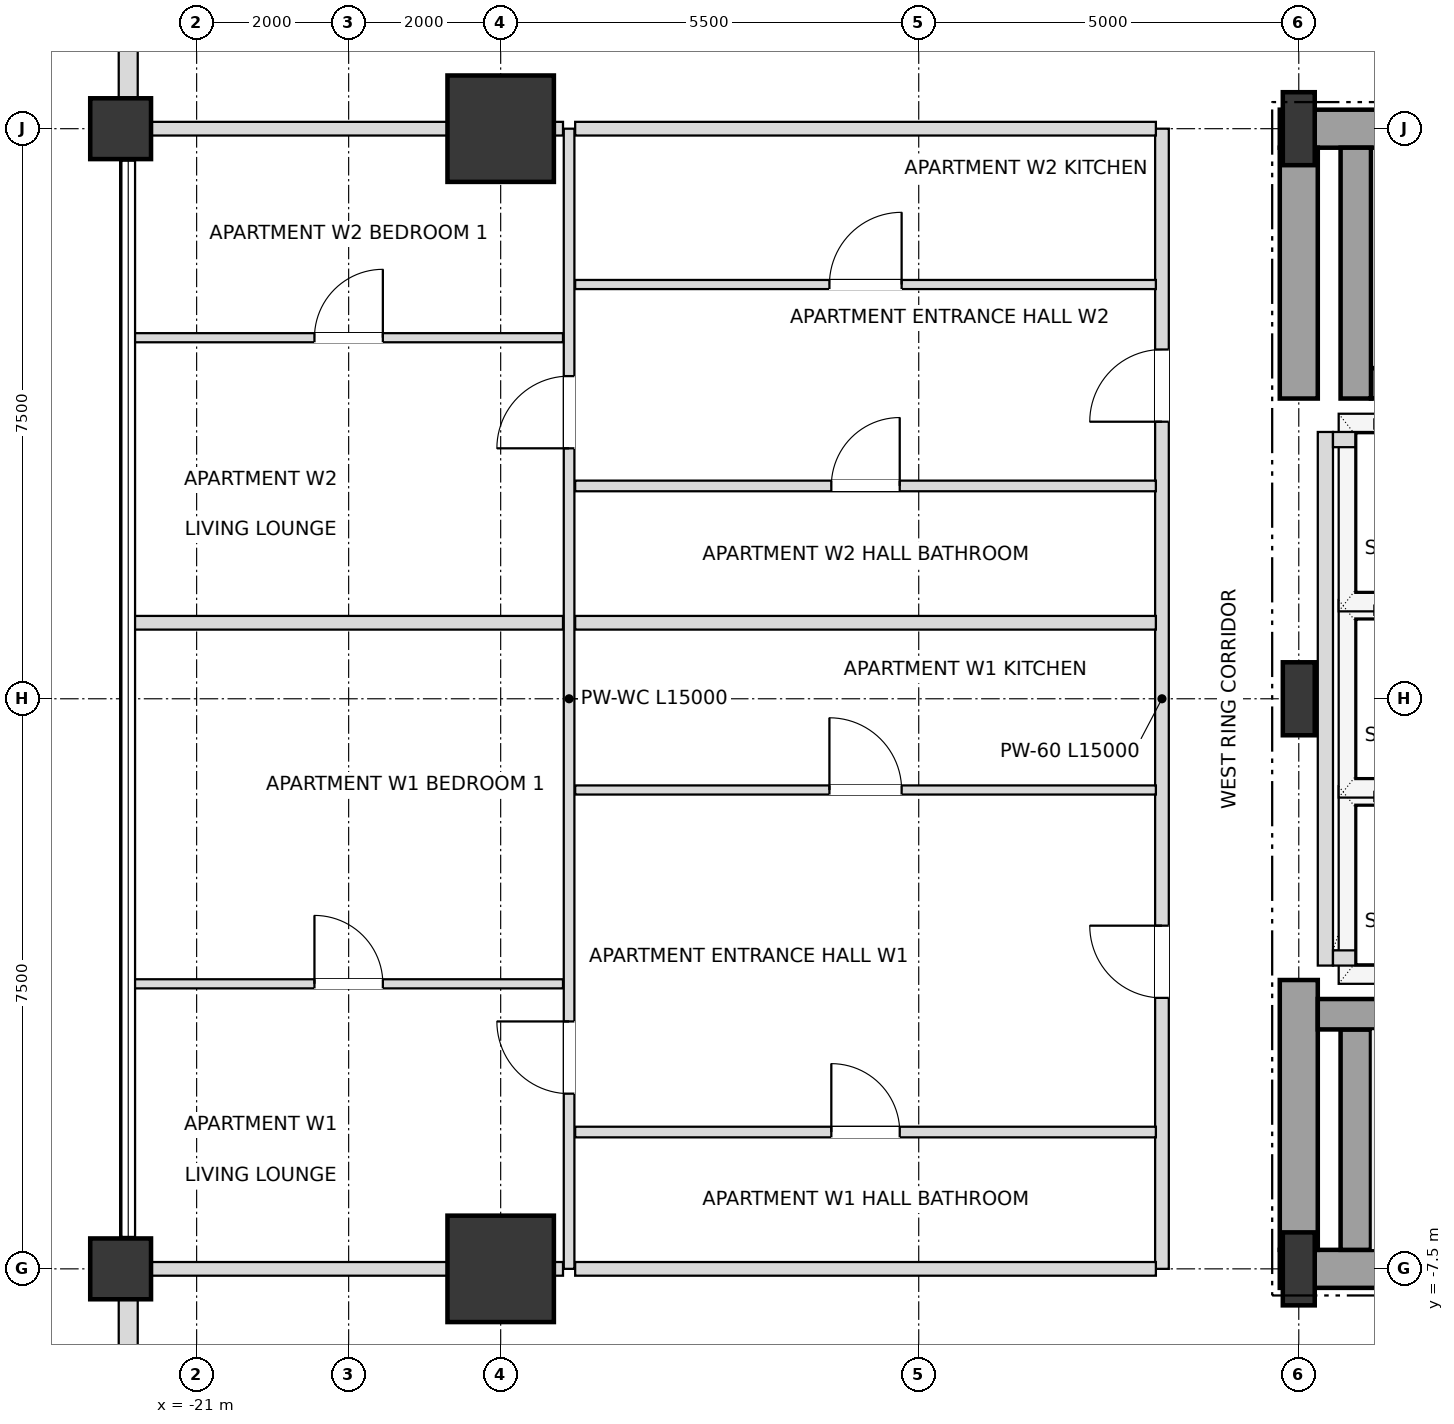
"""IFC4 building model, lengths in metres.
Left out: names, types, materials, properties, quantities, classifications, styles, units other than length and angle.
Written with IfcOpenShell. Run it as: python <this file> out.ifc"""

import sys

from ifc_helpers import new_model, si_unit, direction, frame, frame_2d, origin, origin_2d, place, context, subcontext, project, spatial, rectangle, i_section, extrude, element, fill, save


model = new_model("IFC4")
c1 = context("Model", 3, precision=1e-05, world=origin(), true_north=direction((0.0, 1.0)))
c2 = subcontext(c1, "Body", "Model", "MODEL_VIEW")
j1 = project(units=[si_unit("LENGTHUNIT", "METRE"), si_unit("PLANEANGLEUNIT", "RADIAN")], contexts=[c1])
p1 = place(None, origin())
s1 = spatial("IfcSite", under=j1, at=p1, CompositionType="ELEMENT")
p2 = place(p1, origin())
s2 = spatial("IfcBuilding", under=s1, at=p2, CompositionType="ELEMENT")
p3 = place(p2, frame((0.0, 0.0, 36.0)))
s3 = spatial("IfcBuildingStorey", under=s2, at=p3, CompositionType="ELEMENT", Elevation=36.0)
for number, where, z_axis, x_axis in (
    (1, (-6.5, -7.5, 0.0), (0.0, 0.0, 1.0), (1.0, 0.0, 0.0)),
    (2, (-6.5, 0.0, 0.0), (0.0, 0.0, 1.0), (1.0, 0.0, 0.0)),
    (3, (-6.5, 7.5, 0.0), (0.0, 0.0, 1.0), (1.0, 0.0, 0.0)),
):
    element("IfcColumn", number, at=place(p3, frame(where, z_axis=z_axis, x_axis=x_axis)), inside=s3, PredefinedType="COLUMN", context=c2, shape_type="SweptSolid", body=[
        extrude(i_section(OverallWidth=0.42, OverallDepth=0.96, WebThickness=0.022, FlangeThickness=0.034, at=origin_2d()), origin(), (0.0, 0.0, 1.0), 3.6),
    ])
for number, where, z_axis, x_axis in (
    (4, (-17.0, 7.5, 0.0), (0.0, 0.0, 1.0), (1.0, 0.0, 0.0)),
    (5, (-17.0, -7.5, 0.0), (0.0, 0.0, 1.0), (1.0, 0.0, 0.0)),
):
    element("IfcColumn", number, at=place(p3, frame(where, z_axis=z_axis, x_axis=x_axis)), inside=s3, PredefinedType="USERDEFINED", context=c2, shape_type="SweptSolid", body=[
        extrude(rectangle(XDim=1.4, YDim=1.4, at=origin_2d()), origin(), (0.0, 0.0, 1.0), 3.6),
    ])
for number, where, z_axis, x_axis in (
    (6, (-22.0, -7.5, 0.0), (0.0, 0.0, 1.0), (1.0, 0.0, 0.0)),
    (7, (-22.0, 7.5, 0.0), (0.0, 0.0, 1.0), (1.0, 0.0, 0.0)),
):
    element("IfcColumn", number, at=place(p3, frame(where, z_axis=z_axis, x_axis=x_axis)), inside=s3, PredefinedType="COLUMN", context=c2, shape_type="SweptSolid", body=[
        extrude(rectangle(XDim=0.8, YDim=0.8, at=origin_2d()), origin(), (0.0, 0.0, 1.0), 3.6),
    ])
p4 = place(p3, frame((-21.9, 12.605, 0.0), z_axis=(0.0, 0.0, 1.0), x_axis=(0.0, -1.0, 0.0)))
e8 = element("IfcWall", 8, at=p4, inside=s3, PredefinedType="SOLIDWALL", context=c2, shape_type="SweptSolid", body=[
    extrude(rectangle(XDim=4.71, YDim=0.25, at=frame_2d((2.355, 0.0))), origin(), (0.0, 0.0, 1.0), 2.736),
])
p5 = place(p4, frame((1.455, 0.0, 0.72)))
e9 = element("IfcOpeningElement", 9, at=p5, cuts=e8, PredefinedType="OPENING", context=c2, shape_type="SweptSolid", body=[
    extrude(rectangle(XDim=1.8, YDim=1.68, at=frame_2d((0.9, 0.84))), frame((0.0, 0.135, 0.0), z_axis=(0.0, -1.0, 0.0), x_axis=(1.0, 0.0, 0.0)), (0.0, 0.0, 1.0), 0.27),
])
p6 = place(p3, frame((-21.9, -7.895, 0.0), z_axis=(0.0, 0.0, 1.0), x_axis=(0.0, -1.0, 0.0)))
e10 = element("IfcWall", 10, at=p6, inside=s3, PredefinedType="SOLIDWALL", context=c2, shape_type="SweptSolid", body=[
    extrude(rectangle(XDim=4.71, YDim=0.25, at=frame_2d((2.355, 0.0))), origin(), (0.0, 0.0, 1.0), 2.736),
])
p7 = place(p6, frame((1.455, 0.0, 0.72)))
e11 = element("IfcOpeningElement", 11, at=p7, cuts=e10, PredefinedType="OPENING", context=c2, shape_type="SweptSolid", body=[
    extrude(rectangle(XDim=1.8, YDim=1.68, at=frame_2d((0.9, 0.84))), frame((0.0, 0.135, 0.0), z_axis=(0.0, -1.0, 0.0), x_axis=(1.0, 0.0, 0.0)), (0.0, 0.0, 1.0), 0.27),
])
p8 = place(p3, frame((-6.75, -7.5, 0.0), z_axis=(0.0, 0.0, 1.0), x_axis=(1.0, 0.0, 0.0)))
e12 = element("IfcWall", 12, at=p8, inside=s3, PredefinedType="SHEAR", context=c2, shape_type="SweptSolid", body=[
    extrude(rectangle(XDim=6.75, YDim=0.5, at=frame_2d((3.375, 0.0))), origin(), (0.0, 0.0, 1.0), 3.38),
])
p9 = place(p3, frame((-6.75, 7.5, 0.0), z_axis=(0.0, 0.0, 1.0), x_axis=(1.0, 0.0, 0.0)))
e13 = element("IfcWall", 13, at=p9, inside=s3, PredefinedType="SHEAR", context=c2, shape_type="SweptSolid", body=[
    extrude(rectangle(XDim=6.75, YDim=0.5, at=frame_2d((3.375, 0.0))), origin(), (0.0, 0.0, 1.0), 3.38),
])
p10 = place(p9, frame((1.65, 0.0, 0.0)))
e14 = element("IfcOpeningElement", 14, at=p10, cuts=e13, PredefinedType="OPENING", context=c2, shape_type="SweptSolid", body=[
    extrude(rectangle(XDim=1.05, YDim=2.15, at=frame_2d((0.525, 1.075))), frame((0.0, 0.26, 0.0), z_axis=(0.0, -1.0, 0.0), x_axis=(1.0, 0.0, 0.0)), (0.0, 0.0, 1.0), 0.52),
])
p11 = place(p3, frame((-6.5, -7.25, 0.0), z_axis=(0.0, 0.0, 1.0), x_axis=(0.0, 1.0, 0.0)))
e15 = element("IfcWall", 15, at=p11, inside=s3, PredefinedType="SHEAR", context=c2, shape_type="SweptSolid", body=[
    extrude(rectangle(XDim=3.55, YDim=0.5, at=frame_2d((1.775, 0.0))), origin(), (0.0, 0.0, 1.0), 3.38),
])
p12 = place(p3, frame((-6.5, 3.95, 0.0), z_axis=(0.0, 0.0, 1.0), x_axis=(0.0, 1.0, 0.0)))
e16 = element("IfcWall", 16, at=p12, inside=s3, PredefinedType="SHEAR", context=c2, shape_type="SweptSolid", body=[
    extrude(rectangle(XDim=3.3, YDim=0.5, at=frame_2d((1.65, 0.0))), origin(), (0.0, 0.0, 1.0), 3.38),
])
p13 = place(p3, frame((-5.75, -7.25, 0.0), z_axis=(0.0, 0.0, 1.0), x_axis=(0.0, 1.0, 0.0)))
e17 = element("IfcWall", 17, at=p13, inside=s3, PredefinedType="SHEAR", context=c2, shape_type="SweptSolid", body=[
    extrude(rectangle(XDim=2.9, YDim=0.4, at=frame_2d((1.45, 0.0))), origin(), (0.0, 0.0, 1.0), 3.38),
])
p14 = place(p3, frame((-6.25, -4.15, 0.0), z_axis=(0.0, 0.0, 1.0), x_axis=(1.0, 0.0, 0.0)))
e18 = element("IfcWall", 18, at=p14, inside=s3, PredefinedType="SHEAR", context=c2, shape_type="SweptSolid", body=[
    extrude(rectangle(XDim=7.78, YDim=0.4, at=frame_2d((3.89, 0.0))), origin(), (0.0, 0.0, 1.0), 3.38),
])
p15 = place(p3, frame((-5.55, 4.15, 0.0), z_axis=(0.0, 0.0, 1.0), x_axis=(1.0, 0.0, 0.0)))
e19 = element("IfcWall", 19, at=p15, inside=s3, PredefinedType="SHEAR", context=c2, shape_type="SweptSolid", body=[
    extrude(rectangle(XDim=7.08, YDim=0.4, at=frame_2d((3.54, 0.0))), origin(), (0.0, 0.0, 1.0), 3.38),
])
p16 = place(p3, frame((-5.75, 3.95, 0.0), z_axis=(0.0, 0.0, 1.0), x_axis=(0.0, 1.0, 0.0)))
e20 = element("IfcWall", 20, at=p16, inside=s3, PredefinedType="SHEAR", context=c2, shape_type="SweptSolid", body=[
    extrude(rectangle(XDim=3.3, YDim=0.4, at=frame_2d((1.65, 0.0))), origin(), (0.0, 0.0, 1.0), 3.38),
])
p17 = place(p3, frame((-6.15, -3.51, 0.0), z_axis=(0.0, 0.0, 1.0), x_axis=(0.0, 1.0, 0.0)))
e21 = element("IfcWall", 21, at=p17, inside=s3, PredefinedType="SOLIDWALL", context=c2, shape_type="SweptSolid", body=[
    extrude(rectangle(XDim=7.02, YDim=0.2, at=frame_2d((3.51, 0.0))), origin(), (0.0, 0.0, 1.0), 3.38),
])
for number, where, z_axis, x_axis in (
    (22, (-6.05, -3.41, 0.0), (0.0, 0.0, 1.0), (1.0, 0.0, 0.0)),
    (23, (-6.05, 3.41, 0.0), (0.0, 0.0, 1.0), (1.0, 0.0, 0.0)),
):
    element("IfcWall", number, at=place(p3, frame(where, z_axis=z_axis, x_axis=x_axis)), inside=s3, PredefinedType="SOLIDWALL", context=c2, shape_type="SweptSolid", body=[
        extrude(rectangle(XDim=2.2, YDim=0.2, at=frame_2d((1.1, 0.0))), origin(), (0.0, 0.0, 1.0), 3.38),
    ])
p18 = place(p3, frame((-16.1, -7.5, 0.0), z_axis=(0.0, 0.0, 1.0), x_axis=(0.0, 1.0, 0.0)))
e24 = element("IfcWall", 24, at=p18, inside=s3, PredefinedType="PARTITIONING", context=c2, shape_type="SweptSolid", body=[
    extrude(rectangle(XDim=15.0, YDim=0.14, at=frame_2d((7.5, 0.0))), origin(), (0.0, 0.0, 1.0), 3.38),
])
p19 = place(p18, frame((2.305, 0.0, 0.0)))
e25 = element("IfcOpeningElement", 25, at=p19, cuts=e24, PredefinedType="OPENING", context=c2, shape_type="SweptSolid", body=[
    extrude(rectangle(XDim=0.95, YDim=2.1, at=frame_2d((0.475, 1.05))), frame((0.0, 0.08, 0.0), z_axis=(0.0, -1.0, 0.0), x_axis=(1.0, 0.0, 0.0)), (0.0, 0.0, 1.0), 0.16),
])
p20 = place(p18, frame((10.795, 0.0, 0.0)))
e26 = element("IfcOpeningElement", 26, at=p20, cuts=e24, PredefinedType="OPENING", context=c2, shape_type="SweptSolid", body=[
    extrude(rectangle(XDim=0.95, YDim=2.1, at=frame_2d((0.475, 1.05))), frame((0.0, 0.08, 0.0), z_axis=(0.0, -1.0, 0.0), x_axis=(1.0, 0.0, 0.0)), (0.0, 0.0, 1.0), 0.16),
])
p21 = place(p3, frame((-8.3, -7.5, 0.0), z_axis=(0.0, 0.0, 1.0), x_axis=(0.0, 1.0, 0.0)))
e27 = element("IfcWall", 27, at=p21, inside=s3, PredefinedType="PARTITIONING", context=c2, shape_type="SweptSolid", body=[
    extrude(rectangle(XDim=15.0, YDim=0.18, at=frame_2d((7.5, 0.0))), origin(), (0.0, 0.0, 1.0), 3.38),
])
p22 = place(p21, frame((3.565, 0.0, 0.0)))
e28 = element("IfcOpeningElement", 28, at=p22, cuts=e27, PredefinedType="OPENING", context=c2, shape_type="SweptSolid", body=[
    extrude(rectangle(XDim=0.95, YDim=2.15, at=frame_2d((0.475, 1.075))), frame((0.0, 0.1, 0.0), z_axis=(0.0, -1.0, 0.0), x_axis=(1.0, 0.0, 0.0)), (0.0, 0.0, 1.0), 0.2),
])
p23 = place(p21, frame((11.145, 0.0, 0.0)))
e29 = element("IfcOpeningElement", 29, at=p23, cuts=e27, PredefinedType="OPENING", context=c2, shape_type="SweptSolid", body=[
    extrude(rectangle(XDim=0.95, YDim=2.15, at=frame_2d((0.475, 1.075))), frame((0.0, 0.1, 0.0), z_axis=(0.0, -1.0, 0.0), x_axis=(1.0, 0.0, 0.0)), (0.0, 0.0, 1.0), 0.2),
])
p24 = place(p3, frame((-21.9, -7.5, 0.0), z_axis=(0.0, 0.0, 1.0), x_axis=(1.0, 0.0, 0.0)))
e30 = element("IfcWall", 30, at=p24, inside=s3, PredefinedType="PARTITIONING", context=c2, shape_type="SweptSolid", body=[
    extrude(rectangle(XDim=5.72, YDim=0.18, at=frame_2d((2.86, 0.0))), origin(), (0.0, 0.0, 1.0), 2.816),
])
p25 = place(p3, frame((-16.02, -7.5, 0.0), z_axis=(0.0, 0.0, 1.0), x_axis=(1.0, 0.0, 0.0)))
e31 = element("IfcWall", 31, at=p25, inside=s3, PredefinedType="PARTITIONING", context=c2, shape_type="SweptSolid", body=[
    extrude(rectangle(XDim=7.64, YDim=0.18, at=frame_2d((3.82, 0.0))), origin(), (0.0, 0.0, 1.0), 2.816),
])
p26 = place(p3, frame((-16.02, -5.7, 0.0), z_axis=(0.0, 0.0, 1.0), x_axis=(1.0, 0.0, 0.0)))
e32 = element("IfcWall", 32, at=p26, inside=s3, PredefinedType="PARTITIONING", context=c2, shape_type="SweptSolid", body=[
    extrude(rectangle(XDim=7.64, YDim=0.14, at=frame_2d((3.82, 0.0))), origin(), (0.0, 0.0, 1.0), 2.948),
])
p27 = place(p26, frame((3.37, 0.0, 0.0)))
e33 = element("IfcOpeningElement", 33, at=p27, cuts=e32, PredefinedType="OPENING", context=c2, shape_type="SweptSolid", body=[
    extrude(rectangle(XDim=0.9, YDim=2.1, at=frame_2d((0.45, 1.05))), frame((0.0, 0.08, 0.0), z_axis=(0.0, -1.0, 0.0), x_axis=(1.0, 0.0, 0.0)), (0.0, 0.0, 1.0), 0.16),
])
p28 = place(p3, frame((-21.82, -3.75, 0.0), z_axis=(0.0, 0.0, 1.0), x_axis=(1.0, 0.0, 0.0)))
e34 = element("IfcWall", 34, at=p28, inside=s3, PredefinedType="PARTITIONING", context=c2, shape_type="SweptSolid", body=[
    extrude(rectangle(XDim=5.64, YDim=0.12, at=frame_2d((2.82, 0.0))), origin(), (0.0, 0.0, 1.0), 2.816),
])
p29 = place(p28, frame((2.37, 0.0, 0.0)))
e35 = element("IfcOpeningElement", 35, at=p29, cuts=e34, PredefinedType="OPENING", context=c2, shape_type="SweptSolid", body=[
    extrude(rectangle(XDim=0.9, YDim=2.1, at=frame_2d((0.45, 1.05))), frame((0.0, 0.07, 0.0), z_axis=(0.0, -1.0, 0.0), x_axis=(1.0, 0.0, 0.0)), (0.0, 0.0, 1.0), 0.14),
])
p30 = place(p3, frame((-16.02, -1.2, 0.0), z_axis=(0.0, 0.0, 1.0), x_axis=(1.0, 0.0, 0.0)))
e36 = element("IfcWall", 36, at=p30, inside=s3, PredefinedType="PARTITIONING", context=c2, shape_type="SweptSolid", body=[
    extrude(rectangle(XDim=7.64, YDim=0.12, at=frame_2d((3.82, 0.0))), origin(), (0.0, 0.0, 1.0), 2.948),
])
p31 = place(p30, frame((3.345, 0.0, 0.0)))
e37 = element("IfcOpeningElement", 37, at=p31, cuts=e36, PredefinedType="OPENING", context=c2, shape_type="SweptSolid", body=[
    extrude(rectangle(XDim=0.95, YDim=2.1, at=frame_2d((0.475, 1.05))), frame((0.0, 0.07, 0.0), z_axis=(0.0, -1.0, 0.0), x_axis=(1.0, 0.0, 0.0)), (0.0, 0.0, 1.0), 0.14),
])
p32 = place(p3, frame((-21.82, 1.0, 0.0), z_axis=(0.0, 0.0, 1.0), x_axis=(1.0, 0.0, 0.0)))
e38 = element("IfcWall", 38, at=p32, inside=s3, PredefinedType="PARTITIONING", context=c2, shape_type="SweptSolid", body=[
    extrude(rectangle(XDim=5.64, YDim=0.18, at=frame_2d((2.82, 0.0))), origin(), (0.0, 0.0, 1.0), 2.816),
])
p33 = place(p3, frame((-16.02, 1.0, 0.0), z_axis=(0.0, 0.0, 1.0), x_axis=(1.0, 0.0, 0.0)))
e39 = element("IfcWall", 39, at=p33, inside=s3, PredefinedType="PARTITIONING", context=c2, shape_type="SweptSolid", body=[
    extrude(rectangle(XDim=7.64, YDim=0.18, at=frame_2d((3.82, 0.0))), origin(), (0.0, 0.0, 1.0), 2.948),
])
p34 = place(p3, frame((-16.02, 2.8, 0.0), z_axis=(0.0, 0.0, 1.0), x_axis=(1.0, 0.0, 0.0)))
e40 = element("IfcWall", 40, at=p34, inside=s3, PredefinedType="PARTITIONING", context=c2, shape_type="SweptSolid", body=[
    extrude(rectangle(XDim=7.64, YDim=0.14, at=frame_2d((3.82, 0.0))), origin(), (0.0, 0.0, 1.0), 2.948),
])
p35 = place(p34, frame((3.37, 0.0, 0.0)))
e41 = element("IfcOpeningElement", 41, at=p35, cuts=e40, PredefinedType="OPENING", context=c2, shape_type="SweptSolid", body=[
    extrude(rectangle(XDim=0.9, YDim=2.1, at=frame_2d((0.45, 1.05))), frame((0.0, 0.08, 0.0), z_axis=(0.0, -1.0, 0.0), x_axis=(1.0, 0.0, 0.0)), (0.0, 0.0, 1.0), 0.16),
])
p36 = place(p3, frame((-21.82, 4.75, 0.0), z_axis=(0.0, 0.0, 1.0), x_axis=(1.0, 0.0, 0.0)))
e42 = element("IfcWall", 42, at=p36, inside=s3, PredefinedType="PARTITIONING", context=c2, shape_type="SweptSolid", body=[
    extrude(rectangle(XDim=5.64, YDim=0.12, at=frame_2d((2.82, 0.0))), origin(), (0.0, 0.0, 1.0), 2.816),
])
p37 = place(p36, frame((2.37, 0.0, 0.0)))
e43 = element("IfcOpeningElement", 43, at=p37, cuts=e42, PredefinedType="OPENING", context=c2, shape_type="SweptSolid", body=[
    extrude(rectangle(XDim=0.9, YDim=2.1, at=frame_2d((0.45, 1.05))), frame((0.0, 0.07, 0.0), z_axis=(0.0, -1.0, 0.0), x_axis=(1.0, 0.0, 0.0)), (0.0, 0.0, 1.0), 0.14),
])
p38 = place(p3, frame((-16.02, 5.45, 0.0), z_axis=(0.0, 0.0, 1.0), x_axis=(1.0, 0.0, 0.0)))
e44 = element("IfcWall", 44, at=p38, inside=s3, PredefinedType="PARTITIONING", context=c2, shape_type="SweptSolid", body=[
    extrude(rectangle(XDim=7.64, YDim=0.12, at=frame_2d((3.82, 0.0))), origin(), (0.0, 0.0, 1.0), 2.948),
])
p39 = place(p38, frame((3.345, 0.0, 0.0)))
e45 = element("IfcOpeningElement", 45, at=p39, cuts=e44, PredefinedType="OPENING", context=c2, shape_type="SweptSolid", body=[
    extrude(rectangle(XDim=0.95, YDim=2.1, at=frame_2d((0.475, 1.05))), frame((0.0, 0.07, 0.0), z_axis=(0.0, -1.0, 0.0), x_axis=(1.0, 0.0, 0.0)), (0.0, 0.0, 1.0), 0.14),
])
p40 = place(p3, frame((-21.9, 7.5, 0.0), z_axis=(0.0, 0.0, 1.0), x_axis=(1.0, 0.0, 0.0)))
e46 = element("IfcWall", 46, at=p40, inside=s3, PredefinedType="PARTITIONING", context=c2, shape_type="SweptSolid", body=[
    extrude(rectangle(XDim=5.72, YDim=0.18, at=frame_2d((2.86, 0.0))), origin(), (0.0, 0.0, 1.0), 2.816),
])
p41 = place(p3, frame((-16.02, 7.5, 0.0), z_axis=(0.0, 0.0, 1.0), x_axis=(1.0, 0.0, 0.0)))
e47 = element("IfcWall", 47, at=p41, inside=s3, PredefinedType="PARTITIONING", context=c2, shape_type="SweptSolid", body=[
    extrude(rectangle(XDim=7.64, YDim=0.18, at=frame_2d((3.82, 0.0))), origin(), (0.0, 0.0, 1.0), 2.816),
])
p42 = place(p27, origin())
e48 = element("IfcDoor", 48, at=p42, inside=s3, OperationType="SINGLE_SWING_LEFT", PredefinedType="DOOR", context=c2, shape_type="SweptSolid", body=[
    extrude(rectangle(XDim=0.9, YDim=2.1, at=frame_2d((0.45, 1.05))), frame((0.0, 0.025, 0.0), z_axis=(0.0, -1.0, 0.0), x_axis=(1.0, 0.0, 0.0)), (0.0, 0.0, 1.0), 0.05),
])
fill(e33, e48)
p43 = place(p22, origin())
e49 = element("IfcDoor", 49, at=p43, inside=s3, OperationType="SINGLE_SWING_RIGHT", PredefinedType="DOOR", context=c2, shape_type="SweptSolid", body=[
    extrude(rectangle(XDim=0.95, YDim=2.15, at=frame_2d((0.475, 1.075))), frame((0.0, 0.025, 0.0), z_axis=(0.0, -1.0, 0.0), x_axis=(1.0, 0.0, 0.0)), (0.0, 0.0, 1.0), 0.05),
])
fill(e28, e49)
p44 = place(p31, origin())
e50 = element("IfcDoor", 50, at=p44, inside=s3, OperationType="SINGLE_SWING_LEFT", PredefinedType="DOOR", context=c2, shape_type="SweptSolid", body=[
    extrude(rectangle(XDim=0.95, YDim=2.1, at=frame_2d((0.475, 1.05))), frame((0.0, 0.025, 0.0), z_axis=(0.0, -1.0, 0.0), x_axis=(1.0, 0.0, 0.0)), (0.0, 0.0, 1.0), 0.05),
])
fill(e37, e50)
p45 = place(p19, origin())
e51 = element("IfcDoor", 51, at=p45, inside=s3, OperationType="SINGLE_SWING_RIGHT", PredefinedType="DOOR", context=c2, shape_type="SweptSolid", body=[
    extrude(rectangle(XDim=0.95, YDim=2.1, at=frame_2d((0.475, 1.05))), frame((0.0, 0.025, 0.0), z_axis=(0.0, -1.0, 0.0), x_axis=(1.0, 0.0, 0.0)), (0.0, 0.0, 1.0), 0.05),
])
fill(e25, e51)
p46 = place(p29, origin())
e52 = element("IfcDoor", 52, at=p46, inside=s3, OperationType="SINGLE_SWING_LEFT", PredefinedType="DOOR", context=c2, shape_type="SweptSolid", body=[
    extrude(rectangle(XDim=0.9, YDim=2.1, at=frame_2d((0.45, 1.05))), frame((0.0, 0.025, 0.0), z_axis=(0.0, -1.0, 0.0), x_axis=(1.0, 0.0, 0.0)), (0.0, 0.0, 1.0), 0.05),
])
fill(e35, e52)
p47 = place(p35, origin())
e53 = element("IfcDoor", 53, at=p47, inside=s3, OperationType="SINGLE_SWING_RIGHT", PredefinedType="DOOR", context=c2, shape_type="SweptSolid", body=[
    extrude(rectangle(XDim=0.9, YDim=2.1, at=frame_2d((0.45, 1.05))), frame((0.0, 0.025, 0.0), z_axis=(0.0, -1.0, 0.0), x_axis=(1.0, 0.0, 0.0)), (0.0, 0.0, 1.0), 0.05),
])
fill(e41, e53)
p48 = place(p23, origin())
e54 = element("IfcDoor", 54, at=p48, inside=s3, OperationType="SINGLE_SWING_LEFT", PredefinedType="DOOR", context=c2, shape_type="SweptSolid", body=[
    extrude(rectangle(XDim=0.95, YDim=2.15, at=frame_2d((0.475, 1.075))), frame((0.0, 0.025, 0.0), z_axis=(0.0, -1.0, 0.0), x_axis=(1.0, 0.0, 0.0)), (0.0, 0.0, 1.0), 0.05),
])
fill(e29, e54)
p49 = place(p39, origin())
e55 = element("IfcDoor", 55, at=p49, inside=s3, OperationType="SINGLE_SWING_RIGHT", PredefinedType="DOOR", context=c2, shape_type="SweptSolid", body=[
    extrude(rectangle(XDim=0.95, YDim=2.1, at=frame_2d((0.475, 1.05))), frame((0.0, 0.025, 0.0), z_axis=(0.0, -1.0, 0.0), x_axis=(1.0, 0.0, 0.0)), (0.0, 0.0, 1.0), 0.05),
])
fill(e45, e55)
p50 = place(p20, origin())
e56 = element("IfcDoor", 56, at=p50, inside=s3, OperationType="SINGLE_SWING_LEFT", PredefinedType="DOOR", context=c2, shape_type="SweptSolid", body=[
    extrude(rectangle(XDim=0.95, YDim=2.1, at=frame_2d((0.475, 1.05))), frame((0.0, 0.025, 0.0), z_axis=(0.0, -1.0, 0.0), x_axis=(1.0, 0.0, 0.0)), (0.0, 0.0, 1.0), 0.05),
])
fill(e26, e56)
p51 = place(p37, origin())
e57 = element("IfcDoor", 57, at=p51, inside=s3, OperationType="SINGLE_SWING_RIGHT", PredefinedType="DOOR", context=c2, shape_type="SweptSolid", body=[
    extrude(rectangle(XDim=0.9, YDim=2.1, at=frame_2d((0.45, 1.05))), frame((0.0, 0.025, 0.0), z_axis=(0.0, -1.0, 0.0), x_axis=(1.0, 0.0, 0.0)), (0.0, 0.0, 1.0), 0.05),
])
fill(e43, e57)
save(model, sys.argv[1])
